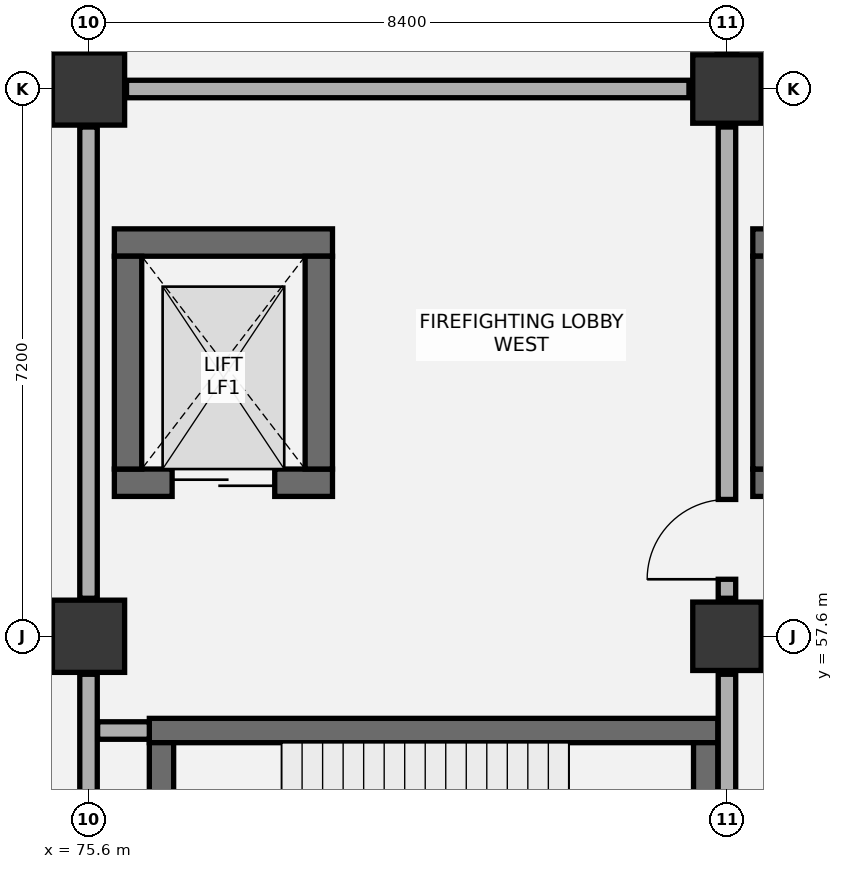
"""IFC4 building model, lengths in metres.
Left out: names, types, materials, properties, quantities, classifications, styles, units other than length and angle.
Written with IfcOpenShell. Run it as: python <this file> out.ifc"""

import sys

from ifc_helpers import new_model, si_unit, direction, frame, frame_2d, origin, origin_2d, place, context, subcontext, project, spatial, rectangle, extrude, element, fill, save


model = new_model("IFC4")
c1 = context("Model", 3, precision=1e-05, world=origin(), true_north=direction((0.0, 1.0)))
c2 = subcontext(c1, "Body", "Model", "MODEL_VIEW")
j1 = project(units=[si_unit("LENGTHUNIT", "METRE"), si_unit("PLANEANGLEUNIT", "RADIAN")], contexts=[c1])
p1 = place(None, origin())
s1 = spatial("IfcSite", under=j1, at=p1, CompositionType="ELEMENT")
p2 = place(p1, origin())
s2 = spatial("IfcBuilding", under=s1, at=p2, CompositionType="ELEMENT")
p3 = place(p2, frame((0.0, 0.0, -9.6)))
s3 = spatial("IfcBuildingStorey", under=s2, at=p3, CompositionType="ELEMENT", Elevation=-9.6)
for number, where, z_axis, x_axis in (
    (1, (75.6, 57.6, 0.0), (0.0, 0.0, 1.0), (1.0, 0.0, 0.0)),
    (2, (75.6, 64.8, 0.0), (0.0, 0.0, 1.0), (1.0, 0.0, 0.0)),
):
    element("IfcColumn", number, at=place(p3, frame(where, z_axis=z_axis, x_axis=x_axis)), inside=s3, PredefinedType="COLUMN", context=c2, shape_type="SweptSolid", body=[
        extrude(rectangle(XDim=0.95, YDim=0.95, at=origin_2d()), origin(), (0.0, 0.0, 1.0), 4.8),
    ])
for number, where, z_axis, x_axis in (
    (3, (84.0, 57.6, 0.0), (0.0, 0.0, 1.0), (1.0, 0.0, 0.0)),
    (4, (84.0, 64.8, 0.0), (0.0, 0.0, 1.0), (1.0, 0.0, 0.0)),
):
    element("IfcColumn", number, at=place(p3, frame(where, z_axis=z_axis, x_axis=x_axis)), inside=s3, PredefinedType="COLUMN", context=c2, shape_type="SweptSolid", body=[
        extrude(rectangle(XDim=0.9, YDim=0.9, at=origin_2d()), origin(), (0.0, 0.0, 1.0), 4.8),
    ])
p4 = place(p3, frame((76.4, 56.36, 0.0), z_axis=(0.0, 0.0, 1.0), x_axis=(1.0, 0.0, 0.0)))
e5 = element("IfcWall", 5, at=p4, inside=s3, PredefinedType="SHEAR", context=c2, shape_type="SweptSolid", body=[
    extrude(rectangle(XDim=7.48, YDim=0.32, at=frame_2d((3.74, 0.0))), origin(), (0.0, 0.0, 1.0), 4.4),
])
for number, where, z_axis, x_axis in (
    (6, (76.56, 52.4, 0.0), (0.0, 0.0, 1.0), (0.0, 1.0, 0.0)),
    (7, (83.72, 52.4, 0.0), (0.0, 0.0, 1.0), (0.0, 1.0, 0.0)),
):
    element("IfcWall", number, at=place(p3, frame(where, z_axis=z_axis, x_axis=x_axis)), inside=s3, PredefinedType="SHEAR", context=c2, shape_type="SweptSolid", body=[
        extrude(rectangle(XDim=3.8, YDim=0.32, at=frame_2d((1.9, 0.0))), origin(), (0.0, 0.0, 1.0), 4.4),
    ])
p5 = place(p3, frame((75.94, 62.78, -0.75), z_axis=(0.0, 0.0, 1.0), x_axis=(1.0, 0.0, 0.0)))
e8 = element("IfcWall", 8, at=p5, inside=s3, PredefinedType="SHEAR", context=c2, shape_type="SweptSolid", body=[
    extrude(rectangle(XDim=2.87, YDim=0.36, at=frame_2d((1.435, 0.0))), origin(), (0.0, 0.0, 1.0), 5.15),
])
p6 = place(p3, frame((75.94, 59.62, -0.75), z_axis=(0.0, 0.0, 1.0), x_axis=(1.0, 0.0, 0.0)))
e9 = element("IfcWall", 9, at=p6, inside=s3, PredefinedType="SHEAR", context=c2, shape_type="SweptSolid", body=[
    extrude(rectangle(XDim=2.87, YDim=0.36, at=frame_2d((1.435, 0.0))), origin(), (0.0, 0.0, 1.0), 5.15),
])
p7 = place(p6, frame((0.76, 0.0, 0.75)))
e10 = element("IfcOpeningElement", 10, at=p7, cuts=e9, PredefinedType="OPENING", context=c2, shape_type="SweptSolid", body=[
    extrude(rectangle(XDim=1.35, YDim=2.2, at=frame_2d((0.675, 1.1))), frame((0.0, 0.19, 0.0), z_axis=(0.0, -1.0, 0.0), x_axis=(1.0, 0.0, 0.0)), (0.0, 0.0, 1.0), 0.38),
])
for number, where, z_axis, x_axis in (
    (11, (76.12, 59.8, -0.75), (0.0, 0.0, 1.0), (0.0, 1.0, 0.0)),
    (12, (78.63, 59.8, -0.75), (0.0, 0.0, 1.0), (0.0, 1.0, 0.0)),
):
    element("IfcWall", number, at=place(p3, frame(where, z_axis=z_axis, x_axis=x_axis)), inside=s3, PredefinedType="SHEAR", context=c2, shape_type="SweptSolid", body=[
        extrude(rectangle(XDim=2.8, YDim=0.36, at=frame_2d((1.4, 0.0))), origin(), (0.0, 0.0, 1.0), 5.15),
    ])
p8 = place(p3, frame((84.34, 62.78, -0.75), z_axis=(0.0, 0.0, 1.0), x_axis=(1.0, 0.0, 0.0)))
e13 = element("IfcWall", 13, at=p8, inside=s3, PredefinedType="SHEAR", context=c2, shape_type="SweptSolid", body=[
    extrude(rectangle(XDim=7.77, YDim=0.36, at=frame_2d((3.885, 0.0))), origin(), (0.0, 0.0, 1.0), 5.15),
])
p9 = place(p3, frame((84.34, 59.62, -0.75), z_axis=(0.0, 0.0, 1.0), x_axis=(1.0, 0.0, 0.0)))
e14 = element("IfcWall", 14, at=p9, inside=s3, PredefinedType="SHEAR", context=c2, shape_type="SweptSolid", body=[
    extrude(rectangle(XDim=2.66, YDim=0.36, at=frame_2d((1.33, 0.0))), origin(), (0.0, 0.0, 1.0), 5.15),
])
p10 = place(p9, frame((0.78, 0.0, 0.75)))
e15 = element("IfcOpeningElement", 15, at=p10, cuts=e14, PredefinedType="OPENING", context=c2, shape_type="SweptSolid", body=[
    extrude(rectangle(XDim=1.1, YDim=2.15, at=frame_2d((0.55, 1.075))), frame((0.0, 0.19, 0.0), z_axis=(0.0, -1.0, 0.0), x_axis=(1.0, 0.0, 0.0)), (0.0, 0.0, 1.0), 0.38),
])
p11 = place(p3, frame((84.52, 59.8, -0.75), z_axis=(0.0, 0.0, 1.0), x_axis=(0.0, 1.0, 0.0)))
e16 = element("IfcWall", 16, at=p11, inside=s3, PredefinedType="SHEAR", context=c2, shape_type="SweptSolid", body=[
    extrude(rectangle(XDim=2.8, YDim=0.36, at=frame_2d((1.4, 0.0))), origin(), (0.0, 0.0, 1.0), 5.15),
])
p12 = place(p3, frame((75.6, 50.9, 0.0), z_axis=(0.0, 0.0, 1.0), x_axis=(0.0, 1.0, 0.0)))
e17 = element("IfcWall", 17, at=p12, inside=s3, PredefinedType="PARTITIONING", context=c2, shape_type="SweptSolid", body=[
    extrude(rectangle(XDim=6.2, YDim=0.23, at=frame_2d((3.1, 0.0))), origin(), (0.0, 0.0, 1.0), 3.595),
])
p13 = place(p12, frame((0.05, 0.0, 0.0)))
e18 = element("IfcOpeningElement", 18, at=p13, cuts=e17, PredefinedType="OPENING", context=c2, shape_type="SweptSolid", body=[
    extrude(rectangle(XDim=1.05, YDim=2.15, at=frame_2d((0.525, 1.075))), frame((0.0, 0.125, 0.0), z_axis=(0.0, -1.0, 0.0), x_axis=(1.0, 0.0, 0.0)), (0.0, 0.0, 1.0), 0.25),
])
p14 = place(p3, frame((75.6, 58.1, 0.0), z_axis=(0.0, 0.0, 1.0), x_axis=(0.0, 1.0, 0.0)))
e19 = element("IfcWall", 19, at=p14, inside=s3, PredefinedType="PARTITIONING", context=c2, shape_type="SweptSolid", body=[
    extrude(rectangle(XDim=6.2, YDim=0.23, at=frame_2d((3.1, 0.0))), origin(), (0.0, 0.0, 1.0), 3.595),
])
p15 = place(p3, frame((84.0, 50.9, 0.0), z_axis=(0.0, 0.0, 1.0), x_axis=(0.0, 1.0, 0.0)))
e20 = element("IfcWall", 20, at=p15, inside=s3, PredefinedType="PARTITIONING", context=c2, shape_type="SweptSolid", body=[
    extrude(rectangle(XDim=6.2, YDim=0.23, at=frame_2d((3.1, 0.0))), origin(), (0.0, 0.0, 1.0), 3.595),
])
p16 = place(p15, frame((0.05, 0.0, 0.0)))
e21 = element("IfcOpeningElement", 21, at=p16, cuts=e20, PredefinedType="OPENING", context=c2, shape_type="SweptSolid", body=[
    extrude(rectangle(XDim=1.05, YDim=2.15, at=frame_2d((0.525, 1.075))), frame((0.0, 0.125, 0.0), z_axis=(0.0, -1.0, 0.0), x_axis=(1.0, 0.0, 0.0)), (0.0, 0.0, 1.0), 0.25),
])
p17 = place(p3, frame((75.72, 56.36, 0.0), z_axis=(0.0, 0.0, 1.0), x_axis=(1.0, 0.0, 0.0)))
e22 = element("IfcWall", 22, at=p17, inside=s3, PredefinedType="PARTITIONING", context=c2, shape_type="SweptSolid", body=[
    extrude(rectangle(XDim=0.68, YDim=0.23, at=frame_2d((0.34, 0.0))), origin(), (0.0, 0.0, 1.0), 4.4),
])
p18 = place(p3, frame((84.0, 58.1, 0.0), z_axis=(0.0, 0.0, 1.0), x_axis=(0.0, 1.0, 0.0)))
e23 = element("IfcWall", 23, at=p18, inside=s3, PredefinedType="PARTITIONING", context=c2, shape_type="SweptSolid", body=[
    extrude(rectangle(XDim=6.2, YDim=0.23, at=frame_2d((3.1, 0.0))), origin(), (0.0, 0.0, 1.0), 3.595),
])
p19 = place(p18, frame((0.25, 0.0, 0.0)))
e24 = element("IfcOpeningElement", 24, at=p19, cuts=e23, PredefinedType="OPENING", context=c2, shape_type="SweptSolid", body=[
    extrude(rectangle(XDim=1.05, YDim=2.15, at=frame_2d((0.525, 1.075))), frame((0.0, 0.125, 0.0), z_axis=(0.0, -1.0, 0.0), x_axis=(1.0, 0.0, 0.0)), (0.0, 0.0, 1.0), 0.25),
])
p20 = place(p3, frame((76.1, 64.8, 0.0), z_axis=(0.0, 0.0, 1.0), x_axis=(1.0, 0.0, 0.0)))
e25 = element("IfcWall", 25, at=p20, inside=s3, PredefinedType="PARTITIONING", context=c2, shape_type="SweptSolid", body=[
    extrude(rectangle(XDim=7.4, YDim=0.23, at=frame_2d((3.7, 0.0))), origin(), (0.0, 0.0, 1.0), 3.495),
])
p21 = place(p7, origin())
e26 = element("IfcDoor", 26, at=p21, inside=s3, OperationType="DOUBLE_DOOR_SLIDING", PredefinedType="DOOR", context=c2, shape_type="SweptSolid", body=[
    extrude(rectangle(XDim=1.35, YDim=2.2, at=frame_2d((0.675, 1.1))), frame((0.0, 0.025, 0.0), z_axis=(0.0, -1.0, 0.0), x_axis=(1.0, 0.0, 0.0)), (0.0, 0.0, 1.0), 0.05),
])
fill(e10, e26)
p22 = place(p19, origin())
e27 = element("IfcDoor", 27, at=p22, inside=s3, OperationType="SINGLE_SWING_LEFT", PredefinedType="DOOR", context=c2, shape_type="SweptSolid", body=[
    extrude(rectangle(XDim=1.05, YDim=2.15, at=frame_2d((0.525, 1.075))), frame((0.0, 0.025, 0.0), z_axis=(0.0, -1.0, 0.0), x_axis=(1.0, 0.0, 0.0)), (0.0, 0.0, 1.0), 0.05),
])
fill(e24, e27)
save(model, sys.argv[1])
